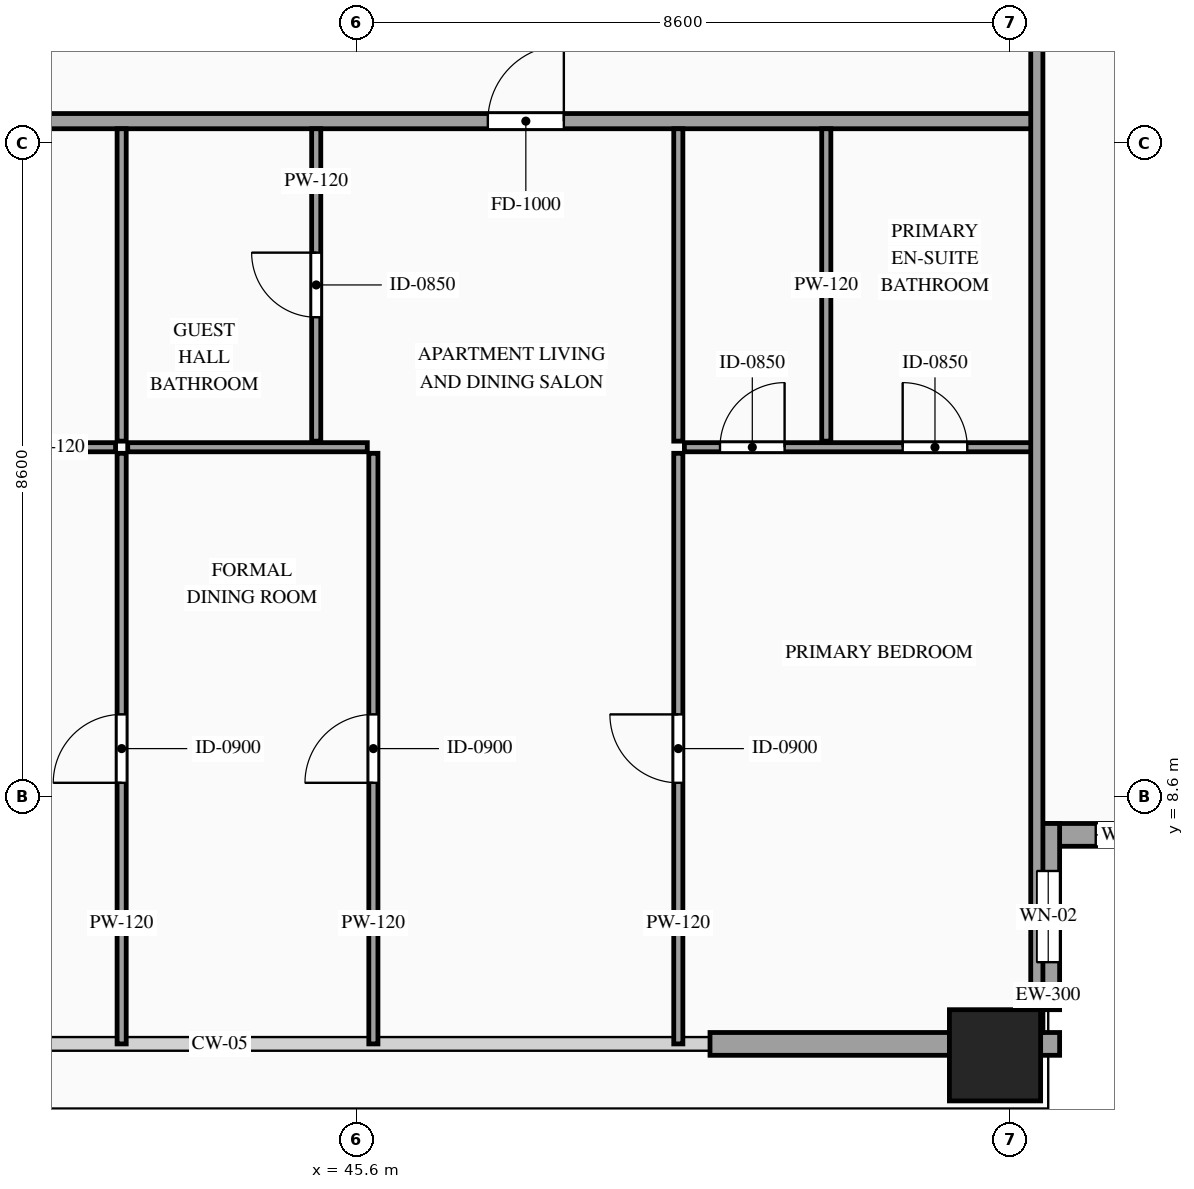
"""IFC4 building model, lengths in metres.
Left out: names, types, materials, properties, quantities, classifications, styles, units other than length and angle.
Written with IfcOpenShell. Run it as: python <this file> out.ifc"""

import sys

from ifc_helpers import new_model, si_unit, direction, frame, frame_2d, origin, origin_2d, place, context, subcontext, project, spatial, rectangle, hollow_rectangle, extrude, source, transform, mapped, element, fill, save


model = new_model("IFC4")
c1 = context("Model", 3, precision=1e-05, world=origin(), true_north=direction((0.0, 1.0)))
c2 = subcontext(c1, "Body", "Model", "MODEL_VIEW")
j1 = project(units=[si_unit("LENGTHUNIT", "METRE"), si_unit("PLANEANGLEUNIT", "RADIAN")], contexts=[c1])
p1 = place(None, origin())
s1 = spatial("IfcSite", under=j1, at=p1, CompositionType="ELEMENT")
p2 = place(p1, origin())
s2 = spatial("IfcBuilding", under=s1, at=p2, CompositionType="ELEMENT")
p3 = place(p2, frame((0.0, 0.0, 224.1)))
s3 = spatial("IfcBuildingStorey", under=s2, at=p3, CompositionType="ELEMENT", Elevation=224.1)
m1 = source(origin(), c2, "Body", "SweptSolid", [
    extrude(hollow_rectangle(XDim=1.2, YDim=1.2, WallThickness=0.055, at=origin_2d()), origin(), (0.0, 0.0, 1.0), 3.5),
])
p4 = place(p3, frame((54.0, 5.2, 0.0), z_axis=(0.0, 0.0, 1.0), x_axis=(1.0, 0.0, 0.0)))
e1 = element("IfcColumn", 1, at=p4, inside=s3, PredefinedType="COLUMN", context=c2, shape_type="MappedRepresentation", body=[
    mapped(m1, transform((0.0, 0.0, 0.0), scale=1.0)),
])
p5 = place(p3, frame((54.55, 8.1, 0.0), z_axis=(0.0, 0.0, 1.0), x_axis=(1.0, 0.0, 0.0)))
e2 = element("IfcWall", 2, at=p5, inside=s3, PredefinedType="SOLIDWALL", context=c2, shape_type="SweptSolid", body=[
    extrude(rectangle(XDim=2.45, YDim=0.3, at=frame_2d((1.225, 0.0))), origin(), (0.0, 0.0, 1.0), 3.28),
])
p6 = place(p5, frame((0.775, 0.0, 0.85)))
e3 = element("IfcOpeningElement", 3, at=p6, cuts=e2, PredefinedType="OPENING", context=c2, shape_type="SweptSolid", body=[
    extrude(rectangle(XDim=0.9, YDim=1.5, at=frame_2d((0.45, 0.75))), frame((0.0, 0.165, 0.0), z_axis=(0.0, -1.0, 0.0), x_axis=(1.0, 0.0, 0.0)), (0.0, 0.0, 1.0), 0.33),
])
p7 = place(p3, frame((54.7, 5.8, 0.0), z_axis=(0.0, 0.0, 1.0), x_axis=(0.0, 1.0, 0.0)))
e4 = element("IfcWall", 4, at=p7, inside=s3, PredefinedType="SOLIDWALL", context=c2, shape_type="SweptSolid", body=[
    extrude(rectangle(XDim=2.45, YDim=0.3, at=frame_2d((1.225, 0.0))), origin(), (0.0, 0.0, 1.0), 3.28),
])
p8 = place(p7, frame((0.625, 0.0, 0.85)))
e5 = element("IfcOpeningElement", 5, at=p8, cuts=e4, PredefinedType="OPENING", context=c2, shape_type="SweptSolid", body=[
    extrude(rectangle(XDim=1.2, YDim=2.1, at=frame_2d((0.6, 1.05))), frame((0.0, 0.165, 0.0), z_axis=(0.0, -1.0, 0.0), x_axis=(1.0, 0.0, 0.0)), (0.0, 0.0, 1.0), 0.33),
])
m2 = source(origin(), c2, "Body", "SweptSolid", [
    extrude(rectangle(XDim=0.25, YDim=0.3, at=frame_2d((0.125, 0.0))), origin(), (0.0, 0.0, 1.0), 3.28),
])
p9 = place(p3, frame((54.6, 5.35, 0.0), z_axis=(0.0, 0.0, 1.0), x_axis=(1.0, 0.0, 0.0)))
e6 = element("IfcWall", 6, at=p9, inside=s3, PredefinedType="SOLIDWALL", context=c2, shape_type="MappedRepresentation", body=[
    mapped(m2, transform((0.0, 0.0, 0.0), scale=1.0)),
])
m3 = source(origin(), c2, "Body", "SweptSolid", [
    extrude(rectangle(XDim=3.15, YDim=0.3, at=frame_2d((1.575, 0.0))), origin(), (0.0, 0.0, 1.0), 2.835),
])
p10 = place(p3, frame((50.25, 5.35, 0.0), z_axis=(0.0, 0.0, 1.0), x_axis=(1.0, 0.0, 0.0)))
e7 = element("IfcWall", 7, at=p10, inside=s3, PredefinedType="SOLIDWALL", context=c2, shape_type="MappedRepresentation", body=[
    mapped(m3, transform((0.0, 0.0, 0.0), scale=1.0)),
])
p11 = place(p3, frame((37.782, 17.49, 0.0), z_axis=(0.0, 0.0, 1.0), x_axis=(1.0, 0.0, 0.0)))
e8 = element("IfcWall", 8, at=p11, inside=s3, PredefinedType="PARTITIONING", context=c2, shape_type="SweptSolid", body=[
    extrude(rectangle(XDim=16.778, YDim=0.2, at=frame_2d((8.389, 0.0))), origin(), (0.0, 0.0, 1.0), 3.28),
])
p12 = place(p11, frame((9.545, 0.0, 0.0)))
e9 = element("IfcOpeningElement", 9, at=p12, cuts=e8, PredefinedType="OPENING", context=c2, shape_type="SweptSolid", body=[
    extrude(rectangle(XDim=1.0, YDim=2.2, at=frame_2d((0.5, 1.1))), frame((0.0, 0.115, 0.0), z_axis=(0.0, -1.0, 0.0), x_axis=(1.0, 0.0, 0.0)), (0.0, 0.0, 1.0), 0.23),
])
p13 = place(p3, frame((37.782, 13.2, 0.0), z_axis=(0.0, 0.0, 1.0), x_axis=(1.0, 0.0, 0.0)))
e10 = element("IfcWall", 10, at=p13, inside=s3, PredefinedType="PARTITIONING", context=c2, shape_type="SweptSolid", body=[
    extrude(rectangle(XDim=4.647, YDim=0.12, at=frame_2d((2.323, 0.0))), origin(), (0.0, 0.0, 1.0), 3.28),
])
p14 = place(p13, frame((1.898, 0.0, 0.0)))
e11 = element("IfcOpeningElement", 11, at=p14, cuts=e10, PredefinedType="OPENING", context=c2, shape_type="SweptSolid", body=[
    extrude(rectangle(XDim=0.85, YDim=2.1, at=frame_2d((0.425, 1.05))), frame((0.0, 0.075, 0.0), z_axis=(0.0, -1.0, 0.0), x_axis=(1.0, 0.0, 0.0)), (0.0, 0.0, 1.0), 0.15),
])
m4 = source(origin(), c2, "Body", "SweptSolid", [
    extrude(rectangle(XDim=4.11, YDim=0.12, at=frame_2d((2.055, 0.0))), origin(), (0.0, 0.0, 1.0), 3.28),
])
p15 = place(p3, frame((42.509, 13.28, 0.0), z_axis=(0.0, 0.0, 1.0), x_axis=(0.0, 1.0, 0.0)))
e12 = element("IfcWall", 12, at=p15, inside=s3, PredefinedType="PARTITIONING", context=c2, shape_type="MappedRepresentation", body=[
    mapped(m4, transform((0.0, 0.0, 0.0), scale=1.0)),
])
p16 = place(p3, frame((45.069, 13.28, 0.0), z_axis=(0.0, 0.0, 1.0), x_axis=(0.0, 1.0, 0.0)))
e13 = element("IfcWall", 13, at=p16, inside=s3, PredefinedType="PARTITIONING", context=c2, shape_type="SweptSolid", body=[
    extrude(rectangle(XDim=4.11, YDim=0.12, at=frame_2d((2.055, 0.0))), origin(), (0.0, 0.0, 1.0), 3.28),
])
p17 = place(p16, frame((1.63, 0.0, 0.0)))
e14 = element("IfcOpeningElement", 14, at=p17, cuts=e13, PredefinedType="OPENING", context=c2, shape_type="SweptSolid", body=[
    extrude(rectangle(XDim=0.85, YDim=2.1, at=frame_2d((0.425, 1.05))), frame((0.0, 0.075, 0.0), z_axis=(0.0, -1.0, 0.0), x_axis=(1.0, 0.0, 0.0)), (0.0, 0.0, 1.0), 0.15),
])
for number, where, z_axis, x_axis in (
    (15, (51.78, 13.28, 0.0), (0.0, 0.0, 1.0), (0.0, 1.0, 0.0)),
    (16, (49.833, 13.28, 0.0), (0.0, 0.0, 1.0), (0.0, 1.0, 0.0)),
):
    element("IfcWall", number, at=place(p3, frame(where, z_axis=z_axis, x_axis=x_axis)), inside=s3, PredefinedType="PARTITIONING", context=c2, shape_type="MappedRepresentation", body=[
        mapped(m4, transform((0.0, 0.0, 0.0), scale=1.0)),
    ])
p18 = place(p3, frame((42.509, 5.35, 0.0), z_axis=(0.0, 0.0, 1.0), x_axis=(0.0, 1.0, 0.0)))
e17 = element("IfcWall", 17, at=p18, inside=s3, PredefinedType="PARTITIONING", context=c2, shape_type="SweptSolid", body=[
    extrude(rectangle(XDim=7.77, YDim=0.12, at=frame_2d((3.885, 0.0))), origin(), (0.0, 0.0, 1.0), 3.28),
])
p19 = place(p18, frame((3.435, 0.0, 0.0)))
e18 = element("IfcOpeningElement", 18, at=p19, cuts=e17, PredefinedType="OPENING", context=c2, shape_type="SweptSolid", body=[
    extrude(rectangle(XDim=0.9, YDim=2.15, at=frame_2d((0.45, 1.075))), frame((0.0, 0.075, 0.0), z_axis=(0.0, -1.0, 0.0), x_axis=(1.0, 0.0, 0.0)), (0.0, 0.0, 1.0), 0.15),
])
p20 = place(p3, frame((49.913, 13.2, 0.0), z_axis=(0.0, 0.0, 1.0), x_axis=(1.0, 0.0, 0.0)))
e19 = element("IfcWall", 19, at=p20, inside=s3, PredefinedType="PARTITIONING", context=c2, shape_type="SweptSolid", body=[
    extrude(rectangle(XDim=4.647, YDim=0.12, at=frame_2d((2.323, 0.0))), origin(), (0.0, 0.0, 1.0), 3.28),
])
p21 = place(p20, frame((2.872, 0.0, 0.0)))
e20 = element("IfcOpeningElement", 20, at=p21, cuts=e19, PredefinedType="OPENING", context=c2, shape_type="SweptSolid", body=[
    extrude(rectangle(XDim=0.85, YDim=2.1, at=frame_2d((0.425, 1.05))), frame((0.0, 0.075, 0.0), z_axis=(0.0, -1.0, 0.0), x_axis=(1.0, 0.0, 0.0)), (0.0, 0.0, 1.0), 0.15),
])
p22 = place(p20, frame((0.469, 0.0, 0.0)))
e21 = element("IfcOpeningElement", 21, at=p22, cuts=e19, PredefinedType="OPENING", context=c2, shape_type="SweptSolid", body=[
    extrude(rectangle(XDim=0.85, YDim=2.1, at=frame_2d((0.425, 1.05))), frame((0.0, 0.075, 0.0), z_axis=(0.0, -1.0, 0.0), x_axis=(1.0, 0.0, 0.0)), (0.0, 0.0, 1.0), 0.15),
])
p23 = place(p3, frame((49.833, 5.35, 0.0), z_axis=(0.0, 0.0, 1.0), x_axis=(0.0, 1.0, 0.0)))
e22 = element("IfcWall", 22, at=p23, inside=s3, PredefinedType="PARTITIONING", context=c2, shape_type="SweptSolid", body=[
    extrude(rectangle(XDim=7.77, YDim=0.12, at=frame_2d((3.885, 0.0))), origin(), (0.0, 0.0, 1.0), 3.28),
])
p24 = place(p23, frame((3.435, 0.0, 0.0)))
e23 = element("IfcOpeningElement", 23, at=p24, cuts=e22, PredefinedType="OPENING", context=c2, shape_type="SweptSolid", body=[
    extrude(rectangle(XDim=0.9, YDim=2.15, at=frame_2d((0.45, 1.075))), frame((0.0, 0.075, 0.0), z_axis=(0.0, -1.0, 0.0), x_axis=(1.0, 0.0, 0.0)), (0.0, 0.0, 1.0), 0.15),
])
m5 = source(origin(), c2, "Body", "SweptSolid", [
    extrude(rectangle(XDim=3.152, YDim=0.12, at=frame_2d((1.576, 0.0))), origin(), (0.0, 0.0, 1.0), 3.28),
])
p25 = place(p3, frame((42.589, 13.2, 0.0), z_axis=(0.0, 0.0, 1.0), x_axis=(1.0, 0.0, 0.0)))
e24 = element("IfcWall", 24, at=p25, inside=s3, PredefinedType="PARTITIONING", context=c2, shape_type="MappedRepresentation", body=[
    mapped(m5, transform((0.0, 0.0, 0.0), scale=1.0)),
])
p26 = place(p3, frame((45.821, 5.35, 0.0), z_axis=(0.0, 0.0, 1.0), x_axis=(0.0, 1.0, 0.0)))
e25 = element("IfcWall", 25, at=p26, inside=s3, PredefinedType="PARTITIONING", context=c2, shape_type="SweptSolid", body=[
    extrude(rectangle(XDim=7.77, YDim=0.12, at=frame_2d((3.885, 0.0))), origin(), (0.0, 0.0, 1.0), 3.28),
])
p27 = place(p26, frame((3.435, 0.0, 0.0)))
e26 = element("IfcOpeningElement", 26, at=p27, cuts=e25, PredefinedType="OPENING", context=c2, shape_type="SweptSolid", body=[
    extrude(rectangle(XDim=0.9, YDim=2.15, at=frame_2d((0.45, 1.075))), frame((0.0, 0.075, 0.0), z_axis=(0.0, -1.0, 0.0), x_axis=(1.0, 0.0, 0.0)), (0.0, 0.0, 1.0), 0.15),
])
m6 = source(origin(), c2, "Body", "SweptSolid", [
    extrude(rectangle(XDim=26.69, YDim=0.16, at=frame_2d((13.345, 0.0))), origin(), (0.0, 0.0, 1.0), 3.28),
])
p28 = place(p3, frame((54.55, 5.5, 0.0), z_axis=(0.0, 0.0, 1.0), x_axis=(0.0, 1.0, 0.0)))
e27 = element("IfcWall", 27, at=p28, inside=s3, PredefinedType="PARTITIONING", context=c2, shape_type="MappedRepresentation", body=[
    mapped(m6, transform((0.0, 0.0, 0.0), scale=1.0)),
])
m7 = source(origin(), c2, "Body", "SweptSolid", [
    extrude(rectangle(XDim=0.9, YDim=1.5, at=frame_2d((0.45, 0.75))), frame((0.0, 0.03, 0.0), z_axis=(0.0, -1.0, 0.0), x_axis=(1.0, 0.0, 0.0)), (0.0, 0.0, 1.0), 0.06),
])
p29 = place(p6, origin())
e28 = element("IfcWindow", 28, at=p29, inside=s3, PartitioningType="SINGLE_PANEL", PredefinedType="WINDOW", context=c2, shape_type="MappedRepresentation", body=[
    mapped(m7, transform((0.0, 0.0, 0.0), scale=1.0)),
])
fill(e3, e28)
m8 = source(origin(), c2, "Body", "SweptSolid", [
    extrude(rectangle(XDim=1.2, YDim=2.1, at=frame_2d((0.6, 1.05))), frame((0.0, 0.03, 0.0), z_axis=(0.0, -1.0, 0.0), x_axis=(1.0, 0.0, 0.0)), (0.0, 0.0, 1.0), 0.06),
])
p30 = place(p8, origin())
e29 = element("IfcWindow", 29, at=p30, inside=s3, PartitioningType="SINGLE_PANEL", PredefinedType="WINDOW", context=c2, shape_type="MappedRepresentation", body=[
    mapped(m8, transform((0.0, 0.0, 0.0), scale=1.0)),
])
fill(e5, e29)
m9 = source(origin(), c2, "Body", "SweptSolid", [
    extrude(rectangle(XDim=1.0, YDim=2.2, at=frame_2d((0.5, 1.1))), frame((0.0, 0.025, 0.0), z_axis=(0.0, -1.0, 0.0), x_axis=(1.0, 0.0, 0.0)), (0.0, 0.0, 1.0), 0.05),
])
p31 = place(p12, origin())
e30 = element("IfcDoor", 30, at=p31, inside=s3, OperationType="SINGLE_SWING_RIGHT", PredefinedType="DOOR", context=c2, shape_type="MappedRepresentation", body=[
    mapped(m9, transform((0.0, 0.0, 0.0), scale=1.0)),
])
fill(e9, e30)
m10 = source(origin(), c2, "Body", "SweptSolid", [
    extrude(rectangle(XDim=0.85, YDim=2.1, at=frame_2d((0.425, 1.05))), frame((0.0, 0.025, 0.0), z_axis=(0.0, -1.0, 0.0), x_axis=(1.0, 0.0, 0.0)), (0.0, 0.0, 1.0), 0.05),
])
p32 = place(p17, origin())
e31 = element("IfcDoor", 31, at=p32, inside=s3, OperationType="SINGLE_SWING_RIGHT", PredefinedType="DOOR", context=c2, shape_type="MappedRepresentation", body=[
    mapped(m10, transform((0.0, 0.0, 0.0), scale=1.0)),
])
fill(e14, e31)
p33 = place(p21, origin())
e32 = element("IfcDoor", 32, at=p33, inside=s3, OperationType="SINGLE_SWING_LEFT", PredefinedType="DOOR", context=c2, shape_type="MappedRepresentation", body=[
    mapped(m10, transform((0.0, 0.0, 0.0), scale=1.0)),
])
fill(e20, e32)
p34 = place(p22, origin())
e33 = element("IfcDoor", 33, at=p34, inside=s3, OperationType="SINGLE_SWING_RIGHT", PredefinedType="DOOR", context=c2, shape_type="MappedRepresentation", body=[
    mapped(m10, transform((0.0, 0.0, 0.0), scale=1.0)),
])
fill(e21, e33)
m11 = source(origin(), c2, "Body", "SweptSolid", [
    extrude(rectangle(XDim=0.9, YDim=2.15, at=frame_2d((0.45, 1.075))), frame((0.0, 0.025, 0.0), z_axis=(0.0, -1.0, 0.0), x_axis=(1.0, 0.0, 0.0)), (0.0, 0.0, 1.0), 0.05),
])
p35 = place(p19, origin())
e34 = element("IfcDoor", 34, at=p35, inside=s3, OperationType="SINGLE_SWING_LEFT", PredefinedType="DOOR", context=c2, shape_type="MappedRepresentation", body=[
    mapped(m11, transform((0.0, 0.0, 0.0), scale=1.0)),
])
fill(e18, e34)
p36 = place(p24, origin())
e35 = element("IfcDoor", 35, at=p36, inside=s3, OperationType="SINGLE_SWING_RIGHT", PredefinedType="DOOR", context=c2, shape_type="MappedRepresentation", body=[
    mapped(m11, transform((0.0, 0.0, 0.0), scale=1.0)),
])
fill(e23, e35)
p37 = place(p27, origin())
e36 = element("IfcDoor", 36, at=p37, inside=s3, OperationType="SINGLE_SWING_LEFT", PredefinedType="DOOR", context=c2, shape_type="MappedRepresentation", body=[
    mapped(m11, transform((0.0, 0.0, 0.0), scale=1.0)),
])
fill(e26, e36)
save(model, sys.argv[1])
